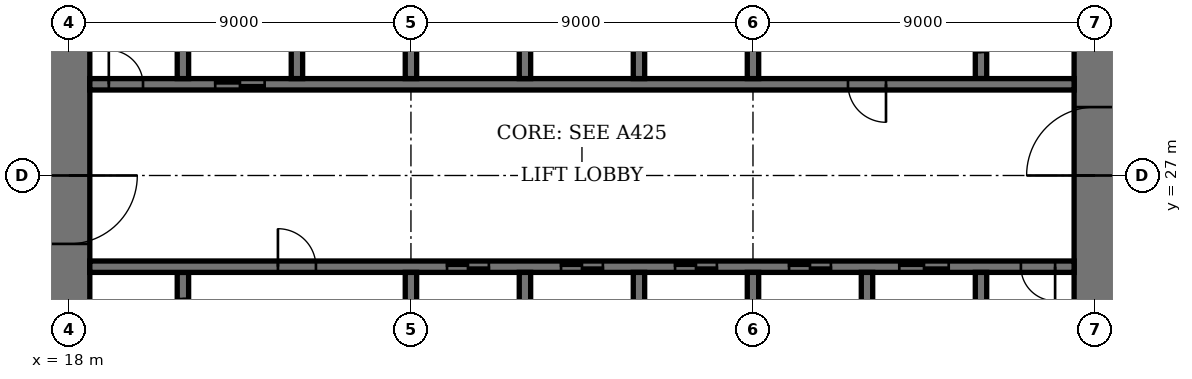
"""IFC4 building model, lengths in metres.
Left out: names, types, materials, properties, quantities, classifications, styles, units other than length and angle.
Written with IfcOpenShell. Run it as: python <this file> out.ifc"""

import sys

from ifc_helpers import new_model, si_unit, direction, frame, frame_2d, origin, place, context, subcontext, project, spatial, rectangle, extrude, element, fill, save


model = new_model("IFC4")
c1 = context("Model", 3, precision=1e-05, world=origin(), true_north=direction((0.0, 1.0)))
c2 = subcontext(c1, "Body", "Model", "MODEL_VIEW")
j1 = project(units=[si_unit("LENGTHUNIT", "METRE"), si_unit("PLANEANGLEUNIT", "RADIAN")], contexts=[c1])
p1 = place(None, origin())
s1 = spatial("IfcSite", under=j1, at=p1, CompositionType="ELEMENT")
p2 = place(p1, origin())
s2 = spatial("IfcBuilding", under=s1, at=p2, CompositionType="ELEMENT")
p3 = place(p2, frame((0.0, 0.0, 23.8)))
s3 = spatial("IfcBuildingStorey", under=s2, at=p3, CompositionType="ELEMENT", Elevation=23.8)
p4 = place(p3, frame((18.0, 35.45, 0.0), z_axis=(0.0, 0.0, 1.0), x_axis=(0.0, -1.0, 0.0)))
e1 = element("IfcWall", 1, at=p4, inside=s3, PredefinedType="SHEAR", context=c2, shape_type="SweptSolid", body=[
    extrude(rectangle(XDim=16.9, YDim=1.1, at=frame_2d((8.45, 0.0))), origin(), (0.0, 0.0, 1.0), 4.0),
])
p5 = place(p4, frame((8.45, 0.0, 0.0)))
e2 = element("IfcOpeningElement", 2, at=p5, cuts=e1, PredefinedType="OPENING", context=c2, shape_type="SweptSolid", body=[
    extrude(rectangle(XDim=1.8, YDim=2.4, at=frame_2d((0.9, 1.2))), frame((0.0, 0.56, 0.0), z_axis=(0.0, -1.0, 0.0), x_axis=(1.0, 0.0, 0.0)), (0.0, 0.0, 1.0), 1.12),
])
p6 = place(p3, frame((45.0, 18.55, 0.0), z_axis=(0.0, 0.0, 1.0), x_axis=(0.0, 1.0, 0.0)))
e3 = element("IfcWall", 3, at=p6, inside=s3, PredefinedType="SHEAR", context=c2, shape_type="SweptSolid", body=[
    extrude(rectangle(XDim=16.9, YDim=1.1, at=frame_2d((8.45, 0.0))), origin(), (0.0, 0.0, 1.0), 4.0),
])
p7 = place(p6, frame((8.45, 0.0, 0.0)))
e4 = element("IfcOpeningElement", 4, at=p7, cuts=e3, PredefinedType="OPENING", context=c2, shape_type="SweptSolid", body=[
    extrude(rectangle(XDim=1.8, YDim=2.4, at=frame_2d((0.9, 1.2))), frame((0.0, 0.56, 0.0), z_axis=(0.0, -1.0, 0.0), x_axis=(1.0, 0.0, 0.0)), (0.0, 0.0, 1.0), 1.12),
])
p8 = place(p3, frame((21.0, 21.95, 0.0), z_axis=(0.0, 0.0, 1.0), x_axis=(0.0, 1.0, 0.0)))
e5 = element("IfcWall", 5, at=p8, inside=s3, PredefinedType="SHEAR", context=c2, shape_type="SweptSolid", body=[
    extrude(rectangle(XDim=2.5, YDim=0.3, at=frame_2d((1.25, 0.0))), origin(), (0.0, 0.0, 1.0), 4.0),
])
p9 = place(p8, frame((0.7, 0.0, 0.0)))
e6 = element("IfcOpeningElement", 6, at=p9, cuts=e5, PredefinedType="OPENING", context=c2, shape_type="SweptSolid", body=[
    extrude(rectangle(XDim=1.1, YDim=2.4, at=frame_2d((0.55, 1.2))), frame((0.0, 0.16, 0.0), z_axis=(0.0, -1.0, 0.0), x_axis=(1.0, 0.0, 0.0)), (0.0, 0.0, 1.0), 0.32),
])
p10 = place(p3, frame((42.0, 29.55, 0.0), z_axis=(0.0, 0.0, 1.0), x_axis=(0.0, 1.0, 0.0)))
e7 = element("IfcWall", 7, at=p10, inside=s3, PredefinedType="SHEAR", context=c2, shape_type="SweptSolid", body=[
    extrude(rectangle(XDim=2.5, YDim=0.3, at=frame_2d((1.25, 0.0))), origin(), (0.0, 0.0, 1.0), 4.0),
])
p11 = place(p10, frame((0.7, 0.0, 0.0)))
e8 = element("IfcOpeningElement", 8, at=p11, cuts=e7, PredefinedType="OPENING", context=c2, shape_type="SweptSolid", body=[
    extrude(rectangle(XDim=1.1, YDim=2.4, at=frame_2d((0.55, 1.2))), frame((0.0, 0.16, 0.0), z_axis=(0.0, -1.0, 0.0), x_axis=(1.0, 0.0, 0.0)), (0.0, 0.0, 1.0), 0.32),
])
p12 = place(p3, frame((18.55, 24.6, 0.0), z_axis=(0.0, 0.0, 1.0), x_axis=(1.0, 0.0, 0.0)))
e9 = element("IfcWall", 9, at=p12, inside=s3, PredefinedType="SHEAR", context=c2, shape_type="SweptSolid", body=[
    extrude(rectangle(XDim=25.9, YDim=0.3, at=frame_2d((12.95, 0.0))), origin(), (0.0, 0.0, 1.0), 4.0),
])
p13 = place(p12, frame((4.95, 0.0, 0.0)))
e10 = element("IfcOpeningElement", 10, at=p13, cuts=e9, PredefinedType="OPENING", context=c2, shape_type="SweptSolid", body=[
    extrude(rectangle(XDim=1.0, YDim=2.4, at=frame_2d((0.5, 1.2))), frame((0.0, 0.16, 0.0), z_axis=(0.0, -1.0, 0.0), x_axis=(1.0, 0.0, 0.0)), (0.0, 0.0, 1.0), 0.32),
])
p14 = place(p12, frame((24.5, 0.0, 0.0)))
e11 = element("IfcOpeningElement", 11, at=p14, cuts=e9, PredefinedType="OPENING", context=c2, shape_type="SweptSolid", body=[
    extrude(rectangle(XDim=0.9, YDim=2.1, at=frame_2d((0.45, 1.05))), frame((0.0, 0.16, 0.0), z_axis=(0.0, -1.0, 0.0), x_axis=(1.0, 0.0, 0.0)), (0.0, 0.0, 1.0), 0.32),
])
p15 = place(p12, frame((9.4, 0.0, 0.0)))
e12 = element("IfcOpeningElement", 12, at=p15, cuts=e9, PredefinedType="OPENING", context=c2, shape_type="SweptSolid", body=[
    extrude(rectangle(XDim=1.1, YDim=2.4, at=frame_2d((0.55, 1.2))), frame((0.0, 0.16, 0.0), z_axis=(0.0, -1.0, 0.0), x_axis=(1.0, 0.0, 0.0)), (0.0, 0.0, 1.0), 0.32),
])
p16 = place(p12, frame((12.4, 0.0, 0.0)))
e13 = element("IfcOpeningElement", 13, at=p16, cuts=e9, PredefinedType="OPENING", context=c2, shape_type="SweptSolid", body=[
    extrude(rectangle(XDim=1.1, YDim=2.4, at=frame_2d((0.55, 1.2))), frame((0.0, 0.16, 0.0), z_axis=(0.0, -1.0, 0.0), x_axis=(1.0, 0.0, 0.0)), (0.0, 0.0, 1.0), 0.32),
])
p17 = place(p12, frame((15.4, 0.0, 0.0)))
e14 = element("IfcOpeningElement", 14, at=p17, cuts=e9, PredefinedType="OPENING", context=c2, shape_type="SweptSolid", body=[
    extrude(rectangle(XDim=1.1, YDim=2.4, at=frame_2d((0.55, 1.2))), frame((0.0, 0.16, 0.0), z_axis=(0.0, -1.0, 0.0), x_axis=(1.0, 0.0, 0.0)), (0.0, 0.0, 1.0), 0.32),
])
p18 = place(p12, frame((18.4, 0.0, 0.0)))
e15 = element("IfcOpeningElement", 15, at=p18, cuts=e9, PredefinedType="OPENING", context=c2, shape_type="SweptSolid", body=[
    extrude(rectangle(XDim=1.1, YDim=2.4, at=frame_2d((0.55, 1.2))), frame((0.0, 0.16, 0.0), z_axis=(0.0, -1.0, 0.0), x_axis=(1.0, 0.0, 0.0)), (0.0, 0.0, 1.0), 0.32),
])
p19 = place(p12, frame((21.3, 0.0, 0.0)))
e16 = element("IfcOpeningElement", 16, at=p19, cuts=e9, PredefinedType="OPENING", context=c2, shape_type="SweptSolid", body=[
    extrude(rectangle(XDim=1.3, YDim=2.4, at=frame_2d((0.65, 1.2))), frame((0.0, 0.16, 0.0), z_axis=(0.0, -1.0, 0.0), x_axis=(1.0, 0.0, 0.0)), (0.0, 0.0, 1.0), 0.32),
])
p20 = place(p3, frame((18.55, 29.4, 0.0), z_axis=(0.0, 0.0, 1.0), x_axis=(1.0, 0.0, 0.0)))
e17 = element("IfcWall", 17, at=p20, inside=s3, PredefinedType="SHEAR", context=c2, shape_type="SweptSolid", body=[
    extrude(rectangle(XDim=25.9, YDim=0.3, at=frame_2d((12.95, 0.0))), origin(), (0.0, 0.0, 1.0), 4.0),
])
p21 = place(p20, frame((19.95, 0.0, 0.0)))
e18 = element("IfcOpeningElement", 18, at=p21, cuts=e17, PredefinedType="OPENING", context=c2, shape_type="SweptSolid", body=[
    extrude(rectangle(XDim=1.0, YDim=2.4, at=frame_2d((0.5, 1.2))), frame((0.0, 0.16, 0.0), z_axis=(0.0, -1.0, 0.0), x_axis=(1.0, 0.0, 0.0)), (0.0, 0.0, 1.0), 0.32),
])
p22 = place(p20, frame((0.5, 0.0, 0.0)))
e19 = element("IfcOpeningElement", 19, at=p22, cuts=e17, PredefinedType="OPENING", context=c2, shape_type="SweptSolid", body=[
    extrude(rectangle(XDim=0.9, YDim=2.1, at=frame_2d((0.45, 1.05))), frame((0.0, 0.16, 0.0), z_axis=(0.0, -1.0, 0.0), x_axis=(1.0, 0.0, 0.0)), (0.0, 0.0, 1.0), 0.32),
])
p23 = place(p20, frame((3.3, 0.0, 0.0)))
e20 = element("IfcOpeningElement", 20, at=p23, cuts=e17, PredefinedType="OPENING", context=c2, shape_type="SweptSolid", body=[
    extrude(rectangle(XDim=1.3, YDim=2.4, at=frame_2d((0.65, 1.2))), frame((0.0, 0.16, 0.0), z_axis=(0.0, -1.0, 0.0), x_axis=(1.0, 0.0, 0.0)), (0.0, 0.0, 1.0), 0.32),
])
for number, where, z_axis, x_axis in (
    (21, (30.0, 21.75, 0.0), (0.0, 0.0, 1.0), (0.0, 1.0, 0.0)),
    (22, (33.0, 29.55, 0.0), (0.0, 0.0, 1.0), (0.0, 1.0, 0.0)),
    (23, (33.0, 21.75, 0.0), (0.0, 0.0, 1.0), (0.0, 1.0, 0.0)),
    (24, (30.0, 29.55, 0.0), (0.0, 0.0, 1.0), (0.0, 1.0, 0.0)),
    (25, (36.0, 21.75, 0.0), (0.0, 0.0, 1.0), (0.0, 1.0, 0.0)),
    (26, (27.0, 29.55, 0.0), (0.0, 0.0, 1.0), (0.0, 1.0, 0.0)),
):
    element("IfcWall", number, at=place(p3, frame(where, z_axis=z_axis, x_axis=x_axis)), inside=s3, PredefinedType="SHEAR", context=c2, shape_type="SweptSolid", body=[
        extrude(rectangle(XDim=2.7, YDim=0.3, at=frame_2d((1.35, 0.0))), origin(), (0.0, 0.0, 1.0), 4.0),
    ])
for number, where, z_axis, x_axis in (
    (27, (39.0, 18.55, 0.0), (0.0, 0.0, 1.0), (0.0, 1.0, 0.0)),
    (28, (24.0, 29.55, 0.0), (0.0, 0.0, 1.0), (0.0, 1.0, 0.0)),
):
    element("IfcWall", number, at=place(p3, frame(where, z_axis=z_axis, x_axis=x_axis)), inside=s3, PredefinedType="SHEAR", context=c2, shape_type="SweptSolid", body=[
        extrude(rectangle(XDim=5.9, YDim=0.3, at=frame_2d((2.95, 0.0))), origin(), (0.0, 0.0, 1.0), 4.0),
    ])
for number, where, z_axis, x_axis in (
    (29, (42.0, 21.75, 0.0), (0.0, 0.0, 1.0), (0.0, 1.0, 0.0)),
    (30, (21.0, 29.55, 0.0), (0.0, 0.0, 1.0), (0.0, 1.0, 0.0)),
):
    element("IfcWall", number, at=place(p3, frame(where, z_axis=z_axis, x_axis=x_axis)), inside=s3, PredefinedType="SHEAR", context=c2, shape_type="SweptSolid", body=[
        extrude(rectangle(XDim=2.7, YDim=0.3, at=frame_2d((1.35, 0.0))), origin(), (0.0, 0.0, 1.0), 4.0),
    ])
for number, where, z_axis, x_axis in (
    (31, (27.0, 21.6, 0.0), (0.0, 0.0, 1.0), (0.0, 1.0, 0.0)),
    (32, (36.0, 29.55, 0.0), (0.0, 0.0, 1.0), (0.0, 1.0, 0.0)),
):
    element("IfcWall", number, at=place(p3, frame(where, z_axis=z_axis, x_axis=x_axis)), inside=s3, PredefinedType="SHEAR", context=c2, shape_type="SweptSolid", body=[
        extrude(rectangle(XDim=2.85, YDim=0.3, at=frame_2d((1.425, 0.0))), origin(), (0.0, 0.0, 1.0), 4.0),
    ])
p24 = place(p5, origin())
e33 = element("IfcDoor", 33, at=p24, inside=s3, OperationType="DOUBLE_DOOR_DOUBLE_SWING", PredefinedType="DOOR", context=c2, shape_type="SweptSolid", body=[
    extrude(rectangle(XDim=1.8, YDim=2.4, at=frame_2d((0.9, 1.2))), frame((0.0, 0.03, 0.0), z_axis=(0.0, -1.0, 0.0), x_axis=(1.0, 0.0, 0.0)), (0.0, 0.0, 1.0), 0.06),
    extrude(rectangle(XDim=0.04, YDim=2.4, at=frame_2d((0.02, 1.2))), frame((0.0, 0.55, 0.0), z_axis=(0.0, -1.0, 0.0), x_axis=(1.0, 0.0, 0.0)), (0.0, 0.0, 1.0), 1.1),
    extrude(rectangle(XDim=0.04, YDim=2.4, at=frame_2d((1.78, 1.2))), frame((0.0, 0.55, 0.0), z_axis=(0.0, -1.0, 0.0), x_axis=(1.0, 0.0, 0.0)), (0.0, 0.0, 1.0), 1.1),
    extrude(rectangle(XDim=1.8, YDim=0.04, at=frame_2d((0.9, 2.38))), frame((0.0, 0.55, 0.0), z_axis=(0.0, -1.0, 0.0), x_axis=(1.0, 0.0, 0.0)), (0.0, 0.0, 1.0), 1.1),
])
fill(e2, e33)
p25 = place(p7, origin())
e34 = element("IfcDoor", 34, at=p25, inside=s3, OperationType="DOUBLE_DOOR_DOUBLE_SWING", PredefinedType="DOOR", context=c2, shape_type="SweptSolid", body=[
    extrude(rectangle(XDim=1.8, YDim=2.4, at=frame_2d((0.9, 1.2))), frame((0.0, 0.03, 0.0), z_axis=(0.0, -1.0, 0.0), x_axis=(1.0, 0.0, 0.0)), (0.0, 0.0, 1.0), 0.06),
    extrude(rectangle(XDim=0.04, YDim=2.4, at=frame_2d((0.02, 1.2))), frame((0.0, 0.55, 0.0), z_axis=(0.0, -1.0, 0.0), x_axis=(1.0, 0.0, 0.0)), (0.0, 0.0, 1.0), 1.1),
    extrude(rectangle(XDim=0.04, YDim=2.4, at=frame_2d((1.78, 1.2))), frame((0.0, 0.55, 0.0), z_axis=(0.0, -1.0, 0.0), x_axis=(1.0, 0.0, 0.0)), (0.0, 0.0, 1.0), 1.1),
    extrude(rectangle(XDim=1.8, YDim=0.04, at=frame_2d((0.9, 2.38))), frame((0.0, 0.55, 0.0), z_axis=(0.0, -1.0, 0.0), x_axis=(1.0, 0.0, 0.0)), (0.0, 0.0, 1.0), 1.1),
])
fill(e4, e34)
p26 = place(p13, origin())
e35 = element("IfcDoor", 35, at=p26, inside=s3, OperationType="SINGLE_SWING_RIGHT", PredefinedType="DOOR", context=c2, shape_type="SweptSolid", body=[
    extrude(rectangle(XDim=1.0, YDim=2.4, at=frame_2d((0.5, 1.2))), frame((0.0, 0.03, 0.0), z_axis=(0.0, -1.0, 0.0), x_axis=(1.0, 0.0, 0.0)), (0.0, 0.0, 1.0), 0.06),
])
fill(e10, e35)
p27 = place(p21, origin())
e36 = element("IfcDoor", 36, at=p27, inside=s3, OperationType="SINGLE_SWING_RIGHT", PredefinedType="DOOR", context=c2, shape_type="SweptSolid", body=[
    extrude(rectangle(XDim=1.0, YDim=2.4, at=frame_2d((0.5, 1.2))), frame((0.0, 0.03, 0.0), z_axis=(0.0, -1.0, 0.0), x_axis=(1.0, 0.0, 0.0)), (0.0, 0.0, 1.0), 0.06),
])
fill(e18, e36)
p28 = place(p14, origin())
e37 = element("IfcDoor", 37, at=p28, inside=s3, OperationType="SINGLE_SWING_RIGHT", PredefinedType="DOOR", context=c2, shape_type="SweptSolid", body=[
    extrude(rectangle(XDim=0.9, YDim=2.1, at=frame_2d((0.45, 1.05))), frame((0.0, 0.03, 0.0), z_axis=(0.0, -1.0, 0.0), x_axis=(1.0, 0.0, 0.0)), (0.0, 0.0, 1.0), 0.06),
])
fill(e11, e37)
p29 = place(p22, origin())
e38 = element("IfcDoor", 38, at=p29, inside=s3, OperationType="SINGLE_SWING_RIGHT", PredefinedType="DOOR", context=c2, shape_type="SweptSolid", body=[
    extrude(rectangle(XDim=0.9, YDim=2.1, at=frame_2d((0.45, 1.05))), frame((0.0, 0.03, 0.0), z_axis=(0.0, -1.0, 0.0), x_axis=(1.0, 0.0, 0.0)), (0.0, 0.0, 1.0), 0.06),
])
fill(e19, e38)
p30 = place(p15, origin())
e39 = element("IfcDoor", 39, at=p30, inside=s3, OperationType="DOUBLE_DOOR_SLIDING", PredefinedType="DOOR", context=c2, shape_type="SweptSolid", body=[
    extrude(rectangle(XDim=1.1, YDim=2.4, at=frame_2d((0.55, 1.2))), frame((0.0, 0.02, 0.0), z_axis=(0.0, -1.0, 0.0), x_axis=(1.0, 0.0, 0.0)), (0.0, 0.0, 1.0), 0.04),
])
fill(e12, e39)
p31 = place(p16, origin())
e40 = element("IfcDoor", 40, at=p31, inside=s3, OperationType="DOUBLE_DOOR_SLIDING", PredefinedType="DOOR", context=c2, shape_type="SweptSolid", body=[
    extrude(rectangle(XDim=1.1, YDim=2.4, at=frame_2d((0.55, 1.2))), frame((0.0, 0.02, 0.0), z_axis=(0.0, -1.0, 0.0), x_axis=(1.0, 0.0, 0.0)), (0.0, 0.0, 1.0), 0.04),
])
fill(e13, e40)
p32 = place(p17, origin())
e41 = element("IfcDoor", 41, at=p32, inside=s3, OperationType="DOUBLE_DOOR_SLIDING", PredefinedType="DOOR", context=c2, shape_type="SweptSolid", body=[
    extrude(rectangle(XDim=1.1, YDim=2.4, at=frame_2d((0.55, 1.2))), frame((0.0, 0.02, 0.0), z_axis=(0.0, -1.0, 0.0), x_axis=(1.0, 0.0, 0.0)), (0.0, 0.0, 1.0), 0.04),
])
fill(e14, e41)
p33 = place(p18, origin())
e42 = element("IfcDoor", 42, at=p33, inside=s3, OperationType="DOUBLE_DOOR_SLIDING", PredefinedType="DOOR", context=c2, shape_type="SweptSolid", body=[
    extrude(rectangle(XDim=1.1, YDim=2.4, at=frame_2d((0.55, 1.2))), frame((0.0, 0.02, 0.0), z_axis=(0.0, -1.0, 0.0), x_axis=(1.0, 0.0, 0.0)), (0.0, 0.0, 1.0), 0.04),
])
fill(e15, e42)
p34 = place(p19, origin())
e43 = element("IfcDoor", 43, at=p34, inside=s3, OperationType="DOUBLE_DOOR_SLIDING", PredefinedType="DOOR", context=c2, shape_type="SweptSolid", body=[
    extrude(rectangle(XDim=1.3, YDim=2.4, at=frame_2d((0.65, 1.2))), frame((0.0, 0.02, 0.0), z_axis=(0.0, -1.0, 0.0), x_axis=(1.0, 0.0, 0.0)), (0.0, 0.0, 1.0), 0.04),
])
fill(e16, e43)
p35 = place(p23, origin())
e44 = element("IfcDoor", 44, at=p35, inside=s3, OperationType="DOUBLE_DOOR_SLIDING", PredefinedType="DOOR", context=c2, shape_type="SweptSolid", body=[
    extrude(rectangle(XDim=1.3, YDim=2.4, at=frame_2d((0.65, 1.2))), frame((0.0, 0.02, 0.0), z_axis=(0.0, -1.0, 0.0), x_axis=(1.0, 0.0, 0.0)), (0.0, 0.0, 1.0), 0.04),
])
fill(e20, e44)
save(model, sys.argv[1])
